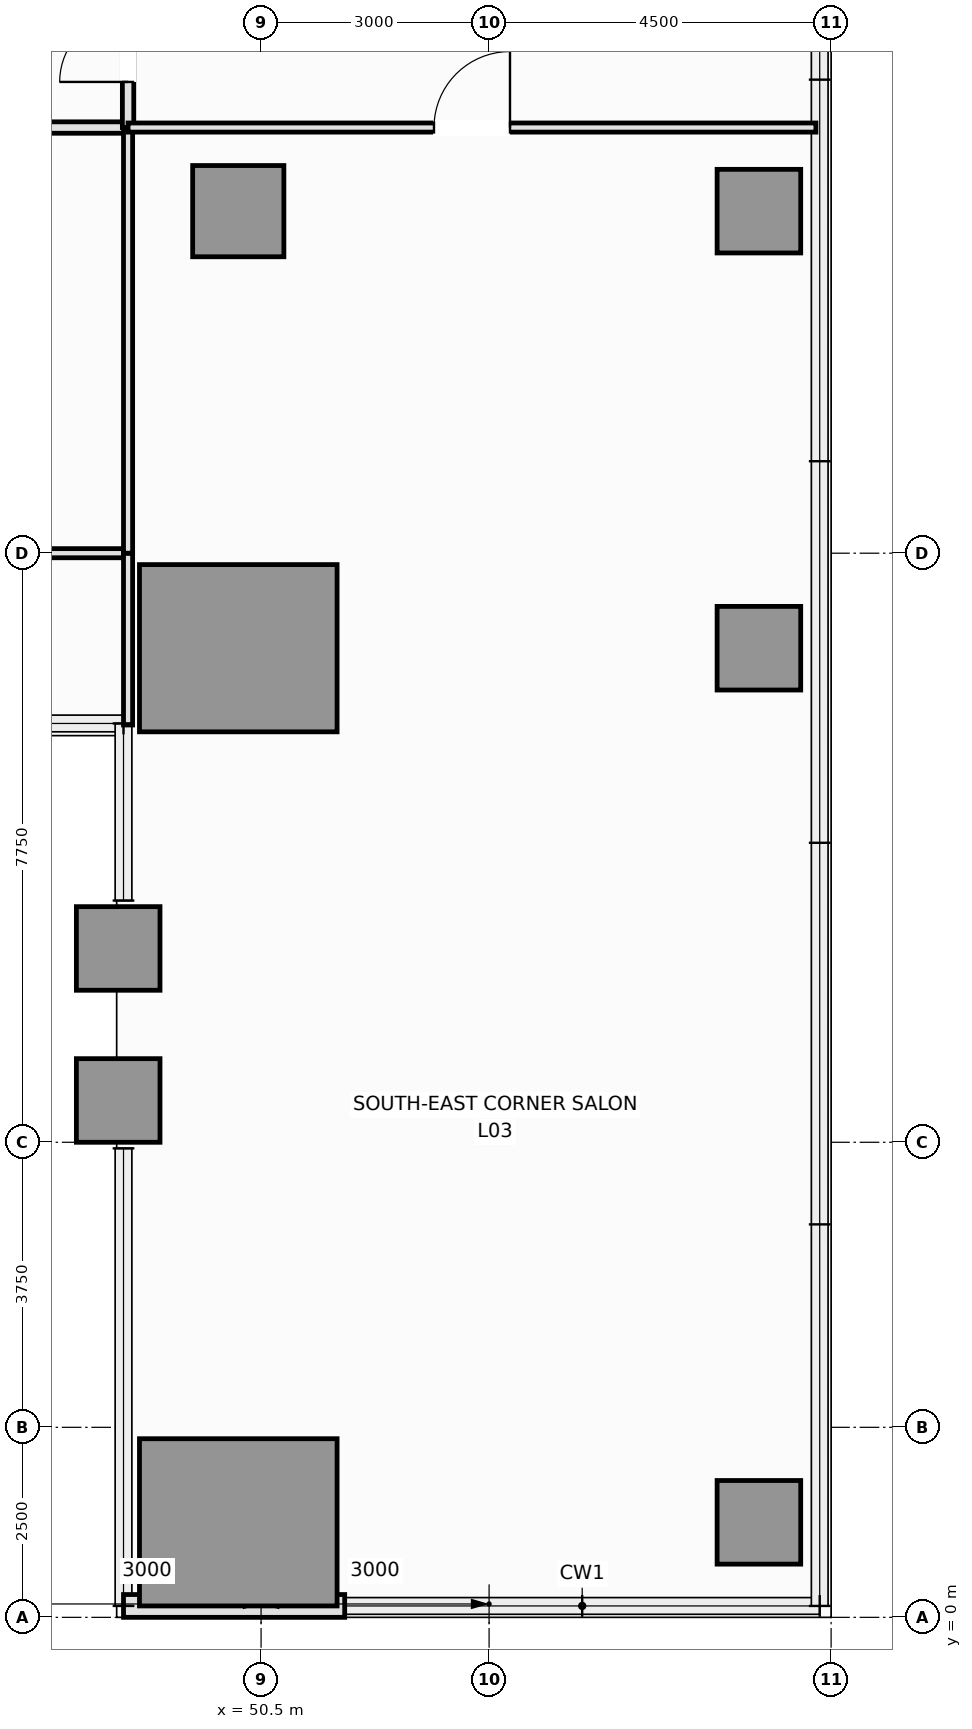
"""IFC4 building model, lengths in metres.
Left out: names, types, materials, properties, quantities, classifications, styles, units other than length and angle.
Written with IfcOpenShell. Run it as: python <this file> out.ifc"""

import sys

from ifc_helpers import new_model, si_unit, direction, frame, frame_2d, origin, origin_2d, place, context, subcontext, project, spatial, rectangle, extrude, element, fill, save


model = new_model("IFC4")
c1 = context("Model", 3, precision=1e-05, world=origin(), true_north=direction((0.0, 1.0)))
c2 = subcontext(c1, "Body", "Model", "MODEL_VIEW")
j1 = project(units=[si_unit("LENGTHUNIT", "METRE"), si_unit("PLANEANGLEUNIT", "RADIAN")], contexts=[c1])
p1 = place(None, origin())
s1 = spatial("IfcSite", under=j1, at=p1, CompositionType="ELEMENT")
p2 = place(p1, origin())
s2 = spatial("IfcBuilding", under=s1, at=p2, CompositionType="ELEMENT")
p3 = place(p2, frame((0.0, 0.0, 15.6)))
s3 = spatial("IfcBuildingStorey", under=s2, at=p3, CompositionType="ELEMENT", Elevation=15.6)
for number, where, z_axis, x_axis in (
    (1, (50.2, 1.25, 0.0), (0.0, 0.0, 1.0), (1.0, 0.0, 0.0)),
    (2, (50.2, 12.75, 0.0), (0.0, 0.0, 1.0), (1.0, 0.0, 0.0)),
):
    element("IfcColumn", number, at=place(p3, frame(where, z_axis=z_axis, x_axis=x_axis)), inside=s3, PredefinedType="COLUMN", context=c2, shape_type="SweptSolid", body=[
        extrude(rectangle(XDim=2.6, YDim=2.2, at=origin_2d()), origin(), (0.0, 0.0, 1.0), 4.8),
    ])
p4 = place(p3, frame((50.2, 18.5, 0.0), z_axis=(0.0, 0.0, 1.0), x_axis=(1.0, 0.0, 0.0)))
e3 = element("IfcColumn", 3, at=p4, inside=s3, PredefinedType="COLUMN", context=c2, shape_type="SweptSolid", body=[
    extrude(rectangle(XDim=1.2, YDim=1.2, at=origin_2d()), origin(), (0.0, 0.0, 1.0), 4.8),
])
for number, where, z_axis, x_axis in (
    (4, (57.05, 1.25, 0.0), (0.0, 0.0, 1.0), (1.0, 0.0, 0.0)),
    (5, (57.05, 12.75, 0.0), (0.0, 0.0, 1.0), (1.0, 0.0, 0.0)),
    (6, (57.05, 18.5, 0.0), (0.0, 0.0, 1.0), (1.0, 0.0, 0.0)),
    (7, (48.62, 6.8, 0.0), (0.0, 0.0, 1.0), (1.0, 0.0, 0.0)),
    (8, (48.62, 8.8, 0.0), (0.0, 0.0, 1.0), (1.0, 0.0, 0.0)),
):
    element("IfcColumn", number, at=place(p3, frame(where, z_axis=z_axis, x_axis=x_axis)), inside=s3, PredefinedType="COLUMN", context=c2, shape_type="SweptSolid", body=[
        extrude(rectangle(XDim=1.1, YDim=1.1, at=origin_2d()), origin(), (0.0, 0.0, 1.0), 4.8),
    ])
p5 = place(p3, frame((48.69, 0.15, 0.0), z_axis=(0.0, 0.0, 1.0), x_axis=(1.0, 0.0, 0.0)))
e9 = element("IfcWall", 9, at=p5, inside=s3, PredefinedType="SOLIDWALL", context=c2, shape_type="SweptSolid", body=[
    extrude(rectangle(XDim=2.91, YDim=0.3, at=frame_2d((1.455, 0.0))), origin(), (0.0, 0.0, 1.0), 4.6),
])
p6 = place(p3, frame((28.4, 19.6, 0.0), z_axis=(0.0, 0.0, 1.0), x_axis=(1.0, 0.0, 0.0)))
e10 = element("IfcWall", 10, at=p6, inside=s3, PredefinedType="PARTITIONING", context=c2, shape_type="SweptSolid", body=[
    extrude(rectangle(XDim=20.35, YDim=0.15, at=frame_2d((10.175, 0.0))), origin(), (0.0, 0.0, 1.0), 4.6),
])
p7 = place(p6, frame((10.796, 0.0, 0.0)))
e11 = element("IfcOpeningElement", 11, at=p7, cuts=e10, PredefinedType="OPENING", context=c2, shape_type="SweptSolid", body=[
    extrude(rectangle(XDim=1.0, YDim=2.15, at=frame_2d((0.5, 1.075))), frame((0.0, 0.085, 0.0), z_axis=(0.0, -1.0, 0.0), x_axis=(1.0, 0.0, 0.0)), (0.0, 0.0, 1.0), 0.17),
])
p8 = place(p3, frame((48.75, 19.6, 0.0), z_axis=(0.0, 0.0, 1.0), x_axis=(0.0, 1.0, 0.0)))
e12 = element("IfcWall", 12, at=p8, inside=s3, PredefinedType="PARTITIONING", context=c2, shape_type="SweptSolid", body=[
    extrude(rectangle(XDim=2.1, YDim=0.15, at=frame_2d((1.05, 0.0))), origin(), (0.0, 0.0, 1.0), 4.6),
])
p9 = place(p8, frame((0.6, 0.0, 0.0)))
e13 = element("IfcOpeningElement", 13, at=p9, cuts=e12, PredefinedType="OPENING", context=c2, shape_type="SweptSolid", body=[
    extrude(rectangle(XDim=0.9, YDim=2.1, at=frame_2d((0.45, 1.05))), frame((0.0, 0.085, 0.0), z_axis=(0.0, -1.0, 0.0), x_axis=(1.0, 0.0, 0.0)), (0.0, 0.0, 1.0), 0.17),
])
p10 = place(p3, frame((28.4, 14.0, 0.0), z_axis=(0.0, 0.0, 1.0), x_axis=(1.0, 0.0, 0.0)))
e14 = element("IfcWall", 14, at=p10, inside=s3, PredefinedType="PARTITIONING", context=c2, shape_type="SweptSolid", body=[
    extrude(rectangle(XDim=20.35, YDim=0.12, at=frame_2d((10.175, 0.0))), origin(), (0.0, 0.0, 1.0), 4.6),
])
p11 = place(p3, frame((48.75, 11.74, 0.0), z_axis=(0.0, 0.0, 1.0), x_axis=(0.0, 1.0, 0.0)))
e15 = element("IfcWall", 15, at=p11, inside=s3, PredefinedType="PARTITIONING", context=c2, shape_type="SweptSolid", body=[
    extrude(rectangle(XDim=2.26, YDim=0.12, at=frame_2d((1.13, 0.0))), origin(), (0.0, 0.0, 1.0), 4.0),
])
p12 = place(p3, frame((48.75, 14.0, 0.0), z_axis=(0.0, 0.0, 1.0), x_axis=(0.0, 1.0, 0.0)))
e16 = element("IfcWall", 16, at=p12, inside=s3, PredefinedType="PARTITIONING", context=c2, shape_type="SweptSolid", body=[
    extrude(rectangle(XDim=5.6, YDim=0.12, at=frame_2d((2.8, 0.0))), origin(), (0.0, 0.0, 1.0), 4.6),
])
p13 = place(p3, frame((48.75, 19.6, 0.0), z_axis=(0.0, 0.0, 1.0), x_axis=(1.0, 0.0, 0.0)))
e17 = element("IfcWall", 17, at=p13, inside=s3, PredefinedType="PARTITIONING", context=c2, shape_type="SweptSolid", body=[
    extrude(rectangle(XDim=9.05, YDim=0.12, at=frame_2d((4.525, 0.0))), origin(), (0.0, 0.0, 1.0), 4.6),
])
p14 = place(p13, frame((4.025, 0.0, 0.0)))
e18 = element("IfcOpeningElement", 18, at=p14, cuts=e17, PredefinedType="OPENING", context=c2, shape_type="SweptSolid", body=[
    extrude(rectangle(XDim=1.0, YDim=2.15, at=frame_2d((0.5, 1.075))), frame((0.0, 0.07, 0.0), z_axis=(0.0, -1.0, 0.0), x_axis=(1.0, 0.0, 0.0)), (0.0, 0.0, 1.0), 0.14),
])
p15 = place(p9, origin())
e19 = element("IfcDoor", 19, at=p15, inside=s3, OperationType="SINGLE_SWING_LEFT", PredefinedType="DOOR", context=c2, shape_type="SweptSolid", body=[
    extrude(rectangle(XDim=0.9, YDim=2.1, at=frame_2d((0.45, 1.05))), frame((0.0, 0.025, 0.0), z_axis=(0.0, -1.0, 0.0), x_axis=(1.0, 0.0, 0.0)), (0.0, 0.0, 1.0), 0.05),
])
fill(e13, e19)
p16 = place(p14, origin())
e20 = element("IfcDoor", 20, at=p16, inside=s3, OperationType="SINGLE_SWING_RIGHT", PredefinedType="DOOR", context=c2, shape_type="SweptSolid", body=[
    extrude(rectangle(XDim=1.0, YDim=2.15, at=frame_2d((0.5, 1.075))), frame((0.0, 0.025, 0.0), z_axis=(0.0, -1.0, 0.0), x_axis=(1.0, 0.0, 0.0)), (0.0, 0.0, 1.0), 0.05),
])
fill(e18, e20)
save(model, sys.argv[1])
